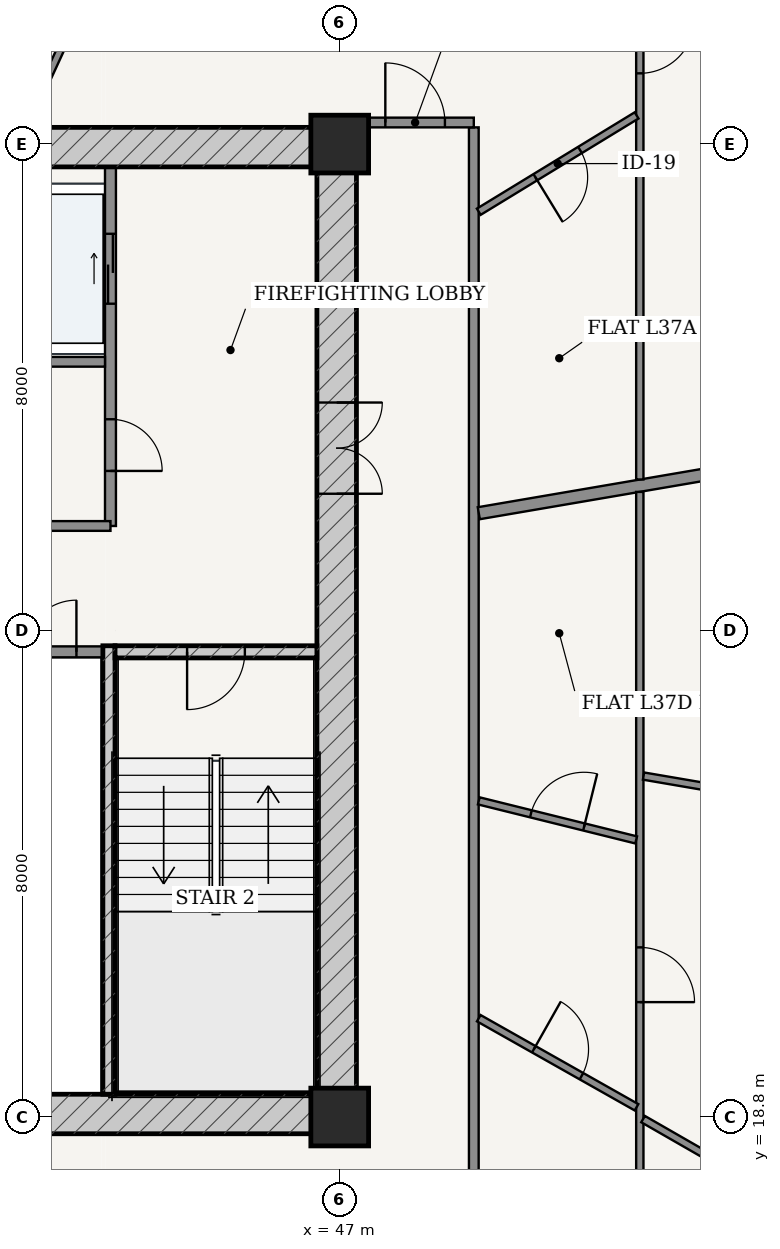
"""IFC4 building model, lengths in metres.
Left out: names, types, materials, properties, quantities, classifications, styles, units other than length and angle.
Written with IfcOpenShell. Run it as: python <this file> out.ifc"""

import sys

from ifc_helpers import new_model, si_unit, direction, frame, frame_2d, origin, origin_2d, place, context, subcontext, project, spatial, rectangle, extrude, source, transform, mapped, element, fill, save


model = new_model("IFC4")
c1 = context("Model", 3, precision=1e-05, world=origin(), true_north=direction((-0.2419218956, 0.970295726276)))
c2 = subcontext(c1, "Body", "Model", "MODEL_VIEW")
j1 = project(units=[si_unit("LENGTHUNIT", "METRE"), si_unit("PLANEANGLEUNIT", "RADIAN")], contexts=[c1])
p1 = place(None, origin())
s1 = spatial("IfcSite", under=j1, at=p1, CompositionType="ELEMENT")
p2 = place(p1, origin())
s2 = spatial("IfcBuilding", under=s1, at=p2, CompositionType="ELEMENT")
p3 = place(p2, frame((0.0, 0.0, 142.6)))
s3 = spatial("IfcBuildingStorey", under=s2, at=p3, CompositionType="ELEMENT", Elevation=142.6)
for number, where, z_axis, x_axis in (
    (1, (47.0, 18.8, 0.0), (0.0, 0.0, 1.0), (1.0, 0.0, 0.0)),
    (2, (47.0, 34.8, 0.0), (0.0, 0.0, 1.0), (1.0, 0.0, 0.0)),
):
    element("IfcColumn", number, at=place(p3, frame(where, z_axis=z_axis, x_axis=x_axis)), inside=s3, PredefinedType="COLUMN", context=c2, shape_type="SweptSolid", body=[
        extrude(rectangle(XDim=0.95, YDim=0.95, at=origin_2d()), origin(), (0.0, 0.0, 1.0), 3.6),
    ])
p4 = place(p3, frame((28.725, 18.85, 0.0), z_axis=(0.0, 0.0, 1.0), x_axis=(1.0, 0.0, 0.0)))
e3 = element("IfcWall", 3, at=p4, inside=s3, PredefinedType="SHEAR", context=c2, shape_type="SweptSolid", body=[
    extrude(rectangle(XDim=18.55, YDim=0.65, at=frame_2d((9.275, 0.0))), origin(), (0.0, 0.0, 1.0), 3.33),
])
p5 = place(p4, frame((6.81, 0.0, 0.0)))
e4 = element("IfcOpeningElement", 4, at=p5, cuts=e3, PredefinedType="OPENING", context=c2, shape_type="SweptSolid", body=[
    extrude(rectangle(XDim=0.85, YDim=2.1, at=frame_2d((0.425, 1.05))), frame((0.0, 0.335, 0.0), z_axis=(0.0, -1.0, 0.0), x_axis=(1.0, 0.0, 0.0)), (0.0, 0.0, 1.0), 0.67),
])
p6 = place(p4, frame((8.85, 0.0, 0.0)))
e5 = element("IfcOpeningElement", 5, at=p6, cuts=e3, PredefinedType="OPENING", context=c2, shape_type="SweptSolid", body=[
    extrude(rectangle(XDim=0.85, YDim=2.1, at=frame_2d((0.425, 1.05))), frame((0.0, 0.335, 0.0), z_axis=(0.0, -1.0, 0.0), x_axis=(1.0, 0.0, 0.0)), (0.0, 0.0, 1.0), 0.67),
])
p7 = place(p4, frame((10.89, 0.0, 0.0)))
e6 = element("IfcOpeningElement", 6, at=p7, cuts=e3, PredefinedType="OPENING", context=c2, shape_type="SweptSolid", body=[
    extrude(rectangle(XDim=0.85, YDim=2.1, at=frame_2d((0.425, 1.05))), frame((0.0, 0.335, 0.0), z_axis=(0.0, -1.0, 0.0), x_axis=(1.0, 0.0, 0.0)), (0.0, 0.0, 1.0), 0.67),
])
p8 = place(p3, frame((28.725, 34.75, 0.0), z_axis=(0.0, 0.0, 1.0), x_axis=(1.0, 0.0, 0.0)))
e7 = element("IfcWall", 7, at=p8, inside=s3, PredefinedType="SHEAR", context=c2, shape_type="SweptSolid", body=[
    extrude(rectangle(XDim=18.55, YDim=0.65, at=frame_2d((9.275, 0.0))), origin(), (0.0, 0.0, 1.0), 3.33),
])
p9 = place(p3, frame((46.95, 19.175, 0.0), z_axis=(0.0, 0.0, 1.0), x_axis=(0.0, 1.0, 0.0)))
e8 = element("IfcWall", 8, at=p9, inside=s3, PredefinedType="SHEAR", context=c2, shape_type="SweptSolid", body=[
    extrude(rectangle(XDim=15.25, YDim=0.65, at=frame_2d((7.625, 0.0))), origin(), (0.0, 0.0, 1.0), 3.33),
])
p10 = place(p9, frame((9.875, 0.0, 0.0)))
e9 = element("IfcOpeningElement", 9, at=p10, cuts=e8, PredefinedType="OPENING", context=c2, shape_type="SweptSolid", body=[
    extrude(rectangle(XDim=1.5, YDim=2.2, at=frame_2d((0.75, 1.1))), frame((0.0, 0.335, 0.0), z_axis=(0.0, -1.0, 0.0), x_axis=(1.0, 0.0, 0.0)), (0.0, 0.0, 1.0), 0.67),
])
p11 = place(p3, frame((43.205, 19.175, 0.0), z_axis=(0.0, 0.0, 1.0), x_axis=(0.0, 1.0, 0.0)))
e10 = element("IfcWall", 10, at=p11, inside=s3, PredefinedType="SOLIDWALL", context=c2, shape_type="SweptSolid", body=[
    extrude(rectangle(XDim=7.375, YDim=0.2, at=frame_2d((3.688, 0.0))), origin(), (0.0, 0.0, 1.0), 3.33),
])
p12 = place(p3, frame((43.305, 26.45, 0.0), z_axis=(0.0, 0.0, 1.0), x_axis=(1.0, 0.0, 0.0)))
e11 = element("IfcWall", 11, at=p12, inside=s3, PredefinedType="SOLIDWALL", context=c2, shape_type="SweptSolid", body=[
    extrude(rectangle(XDim=3.32, YDim=0.2, at=frame_2d((1.66, 0.0))), origin(), (0.0, 0.0, 1.0), 3.33),
])
p13 = place(p12, frame((1.185, 0.0, 0.0)))
e12 = element("IfcOpeningElement", 12, at=p13, cuts=e11, PredefinedType="OPENING", context=c2, shape_type="SweptSolid", body=[
    extrude(rectangle(XDim=0.95, YDim=2.15, at=frame_2d((0.475, 1.075))), frame((0.0, 0.11, 0.0), z_axis=(0.0, -1.0, 0.0), x_axis=(1.0, 0.0, 0.0)), (0.0, 0.0, 1.0), 0.22),
])
p14 = place(p3, frame((41.39, 26.45, 0.0), z_axis=(0.0, 0.0, 1.0), x_axis=(1.0, 0.0, 0.0)))
e13 = element("IfcWall", 13, at=p14, inside=s3, PredefinedType="PARTITIONING", context=c2, shape_type="SweptSolid", body=[
    extrude(rectangle(XDim=1.71, YDim=0.18, at=frame_2d((0.855, 0.0))), origin(), (0.0, 0.0, 1.0), 3.33),
])
p15 = place(p14, frame((0.43, 0.0, 0.0)))
e14 = element("IfcOpeningElement", 14, at=p15, cuts=e13, PredefinedType="OPENING", context=c2, shape_type="SweptSolid", body=[
    extrude(rectangle(XDim=0.85, YDim=2.1, at=frame_2d((0.425, 1.05))), frame((0.0, 0.1, 0.0), z_axis=(0.0, -1.0, 0.0), x_axis=(1.0, 0.0, 0.0)), (0.0, 0.0, 1.0), 0.2),
])
p16 = place(p3, frame((43.23, 28.52, 0.0), z_axis=(0.0, 0.0, 1.0), x_axis=(0.0, 1.0, 0.0)))
e15 = element("IfcWall", 15, at=p16, inside=s3, PredefinedType="PARTITIONING", context=c2, shape_type="SweptSolid", body=[
    extrude(rectangle(XDim=5.905, YDim=0.18, at=frame_2d((2.953, 0.0))), origin(), (0.0, 0.0, 1.0), 3.33),
])
p17 = place(p16, frame((0.905, 0.0, 0.0)))
e16 = element("IfcOpeningElement", 16, at=p17, cuts=e15, PredefinedType="OPENING", context=c2, shape_type="SweptSolid", body=[
    extrude(rectangle(XDim=0.85, YDim=2.1, at=frame_2d((0.425, 1.05))), frame((0.0, 0.1, 0.0), z_axis=(0.0, -1.0, 0.0), x_axis=(1.0, 0.0, 0.0)), (0.0, 0.0, 1.0), 0.2),
])
p18 = place(p16, frame((3.655, 0.0, 0.0)))
e17 = element("IfcOpeningElement", 17, at=p18, cuts=e15, PredefinedType="OPENING", context=c2, shape_type="SweptSolid", body=[
    extrude(rectangle(XDim=1.15, YDim=2.2, at=frame_2d((0.575, 1.1))), frame((0.0, 0.1, 0.0), z_axis=(0.0, -1.0, 0.0), x_axis=(1.0, 0.0, 0.0)), (0.0, 0.0, 1.0), 0.2),
])
p19 = place(p3, frame((41.39, 31.22, 0.0), z_axis=(0.0, 0.0, 1.0), x_axis=(1.0, 0.0, 0.0)))
e18 = element("IfcWall", 18, at=p19, inside=s3, PredefinedType="PARTITIONING", context=c2, shape_type="SweptSolid", body=[
    extrude(rectangle(XDim=1.75, YDim=0.16, at=frame_2d((0.875, 0.0))), origin(), (0.0, 0.0, 1.0), 3.33),
])
p20 = place(p3, frame((41.39, 28.52, 0.0), z_axis=(0.0, 0.0, 1.0), x_axis=(1.0, 0.0, 0.0)))
e19 = element("IfcWall", 19, at=p20, inside=s3, PredefinedType="PARTITIONING", context=c2, shape_type="SweptSolid", body=[
    extrude(rectangle(XDim=1.84, YDim=0.16, at=frame_2d((0.92, 0.0))), origin(), (0.0, 0.0, 1.0), 3.33),
])
p21 = place(p3, frame((49.205, 16.675, 0.0), z_axis=(0.0, 0.0, 1.0), x_axis=(0.0, 1.0, 0.0)))
e20 = element("IfcWall", 20, at=p21, inside=s3, PredefinedType="PARTITIONING", context=c2, shape_type="SweptSolid", body=[
    extrude(rectangle(XDim=18.4, YDim=0.16, at=frame_2d((9.2, 0.0))), origin(), (0.0, 0.0, 1.0), 2.776),
])
p22 = place(p3, frame((47.275, 35.155, 0.0), z_axis=(0.0, 0.0, 1.0), x_axis=(1.0, 0.0, 0.0)))
e21 = element("IfcWall", 21, at=p22, inside=s3, PredefinedType="PARTITIONING", context=c2, shape_type="SweptSolid", body=[
    extrude(rectangle(XDim=1.93, YDim=0.16, at=frame_2d((0.965, 0.0))), origin(), (0.0, 0.0, 1.0), 2.776),
])
p23 = place(p22, frame((0.475, 0.0, 0.0)))
e22 = element("IfcOpeningElement", 22, at=p23, cuts=e21, PredefinedType="OPENING", context=c2, shape_type="SweptSolid", body=[
    extrude(rectangle(XDim=0.98, YDim=2.2, at=frame_2d((0.49, 1.1))), frame((0.0, 0.09, 0.0), z_axis=(0.0, -1.0, 0.0), x_axis=(1.0, 0.0, 0.0)), (0.0, 0.0, 1.0), 0.18),
])
p24 = place(p3, frame((49.287, 28.73, 0.0), z_axis=(0.0, 0.0, 1.0), x_axis=(0.985698993845, 0.168515558725, 0.0)))
e23 = element("IfcWall", 23, at=p24, inside=s3, PredefinedType="PARTITIONING", context=c2, shape_type="SweptSolid", body=[
    extrude(rectangle(XDim=12.517, YDim=0.2, at=frame_2d((6.259, 0.0))), origin(), (0.0, 0.0, 1.0), 2.776),
])
p25 = place(p3, frame((51.935, 37.885, 0.0), z_axis=(0.0, 0.0, 1.0), x_axis=(0.0, -1.0, 0.0)))
e24 = element("IfcWall", 24, at=p25, inside=s3, PredefinedType="PARTITIONING", context=c2, shape_type="SweptSolid", body=[
    extrude(rectangle(XDim=8.601, YDim=0.12, at=frame_2d((4.3, 0.0))), origin(), (0.0, 0.0, 1.0), 2.776),
])
p26 = place(p25, frame((1.021, 0.0, 0.0)))
e25 = element("IfcOpeningElement", 25, at=p26, cuts=e24, PredefinedType="OPENING", context=c2, shape_type="SweptSolid", body=[
    extrude(rectangle(XDim=0.9, YDim=2.15, at=frame_2d((0.45, 1.075))), frame((0.0, 0.07, 0.0), z_axis=(0.0, -1.0, 0.0), x_axis=(1.0, 0.0, 0.0)), (0.0, 0.0, 1.0), 0.14),
])
p27 = place(p3, frame((49.287, 33.688, 0.0), z_axis=(0.0, 0.0, 1.0), x_axis=(0.853628993111, 0.520881504874, 0.0)))
e26 = element("IfcWall", 26, at=p27, inside=s3, PredefinedType="PARTITIONING", context=c2, shape_type="SweptSolid", body=[
    extrude(rectangle(XDim=3.041, YDim=0.12, at=frame_2d((1.52, 0.0))), origin(), (0.0, 0.0, 1.0), 3.005),
])
p28 = place(p27, frame((1.09, 0.0, 0.0)))
e27 = element("IfcOpeningElement", 27, at=p28, cuts=e26, PredefinedType="OPENING", context=c2, shape_type="SweptSolid", body=[
    extrude(rectangle(XDim=0.86, YDim=2.15, at=frame_2d((0.43, 1.075))), frame((0.0, 0.07, 0.0), z_axis=(0.0, -1.0, 0.0), x_axis=(1.0, 0.0, 0.0)), (0.0, 0.0, 1.0), 0.14),
])
p29 = place(p3, frame((41.817, 35.075, 0.0), z_axis=(0.0, 0.0, 1.0), x_axis=(0.418890148101, 0.908036917655, 0.0)))
e28 = element("IfcWall", 28, at=p29, inside=s3, PredefinedType="PARTITIONING", context=c2, shape_type="SweptSolid", body=[
    extrude(rectangle(XDim=2.856, YDim=0.12, at=frame_2d((1.428, 0.0))), origin(), (0.0, 0.0, 1.0), 3.33),
])
p30 = place(p29, frame((0.978, 0.0, 0.0)))
e29 = element("IfcOpeningElement", 29, at=p30, cuts=e28, PredefinedType="OPENING", context=c2, shape_type="SweptSolid", body=[
    extrude(rectangle(XDim=0.9, YDim=2.15, at=frame_2d((0.45, 1.075))), frame((0.0, 0.07, 0.0), z_axis=(0.0, -1.0, 0.0), x_axis=(1.0, 0.0, 0.0)), (0.0, 0.0, 1.0), 0.14),
])
p31 = place(p3, frame((51.935, 29.08, 0.0), z_axis=(0.0, 0.0, 1.0), x_axis=(0.0, -1.0, 0.0)))
e30 = element("IfcWall", 30, at=p31, inside=s3, PredefinedType="PARTITIONING", context=c2, shape_type="SweptSolid", body=[
    extrude(rectangle(XDim=15.215, YDim=0.12, at=frame_2d((7.608, 0.0))), origin(), (0.0, 0.0, 1.0), 2.776),
])
p32 = place(p31, frame((11.859, 0.0, 0.0)))
e31 = element("IfcOpeningElement", 31, at=p32, cuts=e30, PredefinedType="OPENING", context=c2, shape_type="SweptSolid", body=[
    extrude(rectangle(XDim=0.9, YDim=2.15, at=frame_2d((0.45, 1.075))), frame((0.0, 0.07, 0.0), z_axis=(0.0, -1.0, 0.0), x_axis=(1.0, 0.0, 0.0)), (0.0, 0.0, 1.0), 0.14),
])
p33 = place(p31, frame((7.49, 0.0, 0.0)))
e32 = element("IfcOpeningElement", 32, at=p33, cuts=e30, PredefinedType="OPENING", context=c2, shape_type="SweptSolid", body=[
    extrude(rectangle(XDim=0.9, YDim=2.15, at=frame_2d((0.45, 1.075))), frame((0.0, 0.07, 0.0), z_axis=(0.0, -1.0, 0.0), x_axis=(1.0, 0.0, 0.0)), (0.0, 0.0, 1.0), 0.14),
])
p34 = place(p3, frame((51.989, 18.766, 0.0), z_axis=(0.0, 0.0, 1.0), x_axis=(0.86717064002, -0.498011125466, 0.0)))
e33 = element("IfcWall", 33, at=p34, inside=s3, PredefinedType="PARTITIONING", context=c2, shape_type="SweptSolid", body=[
    extrude(rectangle(XDim=6.961, YDim=0.12, at=frame_2d((3.48, 0.0))), origin(), (0.0, 0.0, 1.0), 2.776),
])
p35 = place(p3, frame((51.996, 24.407, 0.0), z_axis=(0.0, 0.0, 1.0), x_axis=(0.985698378271, -0.168519159369, 0.0)))
e34 = element("IfcWall", 34, at=p35, inside=s3, PredefinedType="PARTITIONING", context=c2, shape_type="SweptSolid", body=[
    extrude(rectangle(XDim=9.769, YDim=0.12, at=frame_2d((4.884, 0.0))), origin(), (0.0, 0.0, 1.0), 2.776),
])
p36 = place(p35, frame((3.428, 0.0, 0.0)))
e35 = element("IfcOpeningElement", 35, at=p36, cuts=e34, PredefinedType="OPENING", context=c2, shape_type="SweptSolid", body=[
    extrude(rectangle(XDim=0.9, YDim=2.15, at=frame_2d((0.45, 1.075))), frame((0.0, 0.07, 0.0), z_axis=(0.0, -1.0, 0.0), x_axis=(1.0, 0.0, 0.0)), (0.0, 0.0, 1.0), 0.14),
])
p37 = place(p3, frame((49.287, 20.426, 0.0), z_axis=(0.0, 0.0, 1.0), x_axis=(0.870723023576, -0.491773744942, 0.0)))
e36 = element("IfcWall", 36, at=p37, inside=s3, PredefinedType="PARTITIONING", context=c2, shape_type="SweptSolid", body=[
    extrude(rectangle(XDim=2.98, YDim=0.12, at=frame_2d((1.49, 0.0))), origin(), (0.0, 0.0, 1.0), 2.776),
])
p38 = place(p37, frame((1.04, 0.0, 0.0)))
e37 = element("IfcOpeningElement", 37, at=p38, cuts=e36, PredefinedType="OPENING", context=c2, shape_type="SweptSolid", body=[
    extrude(rectangle(XDim=0.9, YDim=2.15, at=frame_2d((0.45, 1.075))), frame((0.0, 0.07, 0.0), z_axis=(0.0, -1.0, 0.0), x_axis=(1.0, 0.0, 0.0)), (0.0, 0.0, 1.0), 0.14),
])
p39 = place(p3, frame((49.287, 23.999, 0.0), z_axis=(0.0, 0.0, 1.0), x_axis=(0.970571855633, -0.240811696256, 0.0)))
e38 = element("IfcWall", 38, at=p39, inside=s3, PredefinedType="PARTITIONING", context=c2, shape_type="SweptSolid", body=[
    extrude(rectangle(XDim=2.666, YDim=0.12, at=frame_2d((1.333, 0.0))), origin(), (0.0, 0.0, 1.0), 3.33),
])
p40 = place(p39, frame((0.883, 0.0, 0.0)))
e39 = element("IfcOpeningElement", 39, at=p40, cuts=e38, PredefinedType="OPENING", context=c2, shape_type="SweptSolid", body=[
    extrude(rectangle(XDim=0.9, YDim=2.15, at=frame_2d((0.45, 1.075))), frame((0.0, 0.07, 0.0), z_axis=(0.0, -1.0, 0.0), x_axis=(1.0, 0.0, 0.0)), (0.0, 0.0, 1.0), 0.14),
])
m1 = source(origin(), c2, "Body", "SweptSolid", [
    extrude(rectangle(XDim=1.5, YDim=2.2, at=frame_2d((0.75, 1.1))), frame((0.0, 0.025, 0.0), z_axis=(0.0, -1.0, 0.0), x_axis=(1.0, 0.0, 0.0)), (0.0, 0.0, 1.0), 0.05),
])
p41 = place(p10, frame((1.5, 0.0, 0.0), z_axis=(0.0, 0.0, 1.0), x_axis=(-1.0, 0.0, 0.0)))
e40 = element("IfcDoor", 40, at=p41, inside=s3, OperationType="DOUBLE_DOOR_SINGLE_SWING", PredefinedType="DOOR", context=c2, shape_type="MappedRepresentation", body=[
    mapped(m1, transform((0.0, 0.0, 0.0), scale=1.0)),
])
fill(e9, e40)
m2 = source(origin(), c2, "Body", "SweptSolid", [
    extrude(rectangle(XDim=0.95, YDim=2.15, at=frame_2d((0.475, 1.075))), frame((0.0, 0.025, 0.0), z_axis=(0.0, -1.0, 0.0), x_axis=(1.0, 0.0, 0.0)), (0.0, 0.0, 1.0), 0.05),
])
p42 = place(p13, frame((0.95, 0.0, 0.0), z_axis=(0.0, 0.0, 1.0), x_axis=(-1.0, 0.0, 0.0)))
e41 = element("IfcDoor", 41, at=p42, inside=s3, OperationType="SINGLE_SWING_RIGHT", PredefinedType="DOOR", context=c2, shape_type="MappedRepresentation", body=[
    mapped(m2, transform((0.0, 0.0, 0.0), scale=1.0)),
])
fill(e12, e41)
m3 = source(origin(), c2, "Body", "SweptSolid", [
    extrude(rectangle(XDim=0.85, YDim=2.1, at=frame_2d((0.425, 1.05))), frame((0.0, 0.025, 0.0), z_axis=(0.0, -1.0, 0.0), x_axis=(1.0, 0.0, 0.0)), (0.0, 0.0, 1.0), 0.05),
])
p43 = place(p15, origin())
e42 = element("IfcDoor", 42, at=p43, inside=s3, OperationType="SINGLE_SWING_RIGHT", PredefinedType="DOOR", context=c2, shape_type="MappedRepresentation", body=[
    mapped(m3, transform((0.0, 0.0, 0.0), scale=1.0)),
])
fill(e14, e42)
p44 = place(p17, frame((0.85, 0.0, 0.0), z_axis=(0.0, 0.0, 1.0), x_axis=(-1.0, 0.0, 0.0)))
e43 = element("IfcDoor", 43, at=p44, inside=s3, OperationType="SINGLE_SWING_RIGHT", PredefinedType="DOOR", context=c2, shape_type="MappedRepresentation", body=[
    mapped(m3, transform((0.0, 0.0, 0.0), scale=1.0)),
])
fill(e16, e43)
m4 = source(origin(), c2, "Body", "SweptSolid", [
    extrude(rectangle(XDim=1.15, YDim=2.2, at=frame_2d((0.575, 1.1))), frame((0.0, 0.025, 0.0), z_axis=(0.0, -1.0, 0.0), x_axis=(1.0, 0.0, 0.0)), (0.0, 0.0, 1.0), 0.05),
])
p45 = place(p18, origin())
e44 = element("IfcDoor", 44, at=p45, inside=s3, OperationType="DOUBLE_DOOR_SLIDING", PredefinedType="DOOR", context=c2, shape_type="MappedRepresentation", body=[
    mapped(m4, transform((0.0, 0.0, 0.0), scale=1.0)),
])
fill(e17, e44)
m5 = source(origin(), c2, "Body", "SweptSolid", [
    extrude(rectangle(XDim=0.98, YDim=2.2, at=frame_2d((0.49, 1.1))), frame((0.0, 0.025, 0.0), z_axis=(0.0, -1.0, 0.0), x_axis=(1.0, 0.0, 0.0)), (0.0, 0.0, 1.0), 0.05),
])
p46 = place(p23, origin())
e45 = element("IfcDoor", 45, at=p46, inside=s3, OperationType="SINGLE_SWING_LEFT", PredefinedType="DOOR", context=c2, shape_type="MappedRepresentation", body=[
    mapped(m5, transform((0.0, 0.0, 0.0), scale=1.0)),
])
fill(e22, e45)
m6 = source(origin(), c2, "Body", "SweptSolid", [
    extrude(rectangle(XDim=0.86, YDim=2.15, at=frame_2d((0.43, 1.075))), frame((0.0, 0.025, 0.0), z_axis=(0.0, -1.0, 0.0), x_axis=(1.0, 0.0, 0.0)), (0.0, 0.0, 1.0), 0.05),
])
p47 = place(p28, frame((0.86, 0.0, 0.0), z_axis=(0.0, 0.0, 1.0), x_axis=(-1.0, 0.0, 0.0)))
e46 = element("IfcDoor", 46, at=p47, inside=s3, OperationType="SINGLE_SWING_RIGHT", PredefinedType="DOOR", context=c2, shape_type="MappedRepresentation", body=[
    mapped(m6, transform((0.0, 0.0, 0.0), scale=1.0)),
])
fill(e27, e46)
m7 = source(origin(), c2, "Body", "SweptSolid", [
    extrude(rectangle(XDim=0.9, YDim=2.15, at=frame_2d((0.45, 1.075))), frame((0.0, 0.025, 0.0), z_axis=(0.0, -1.0, 0.0), x_axis=(1.0, 0.0, 0.0)), (0.0, 0.0, 1.0), 0.05),
])
p48 = place(p26, origin())
e47 = element("IfcDoor", 47, at=p48, inside=s3, OperationType="SINGLE_SWING_LEFT", PredefinedType="DOOR", context=c2, shape_type="MappedRepresentation", body=[
    mapped(m7, transform((0.0, 0.0, 0.0), scale=1.0)),
])
fill(e25, e47)
p49 = place(p30, origin())
e48 = element("IfcDoor", 48, at=p49, inside=s3, OperationType="SINGLE_SWING_RIGHT", PredefinedType="DOOR", context=c2, shape_type="MappedRepresentation", body=[
    mapped(m7, transform((0.0, 0.0, 0.0), scale=1.0)),
])
fill(e29, e48)
p50 = place(p38, origin())
e49 = element("IfcDoor", 49, at=p50, inside=s3, OperationType="SINGLE_SWING_LEFT", PredefinedType="DOOR", context=c2, shape_type="MappedRepresentation", body=[
    mapped(m7, transform((0.0, 0.0, 0.0), scale=1.0)),
])
fill(e37, e49)
p51 = place(p40, origin())
e50 = element("IfcDoor", 50, at=p51, inside=s3, OperationType="SINGLE_SWING_RIGHT", PredefinedType="DOOR", context=c2, shape_type="MappedRepresentation", body=[
    mapped(m7, transform((0.0, 0.0, 0.0), scale=1.0)),
])
fill(e39, e50)
p52 = place(p33, origin())
e51 = element("IfcDoor", 51, at=p52, inside=s3, OperationType="SINGLE_SWING_RIGHT", PredefinedType="DOOR", context=c2, shape_type="MappedRepresentation", body=[
    mapped(m7, transform((0.0, 0.0, 0.0), scale=1.0)),
])
fill(e32, e51)
save(model, sys.argv[1])
